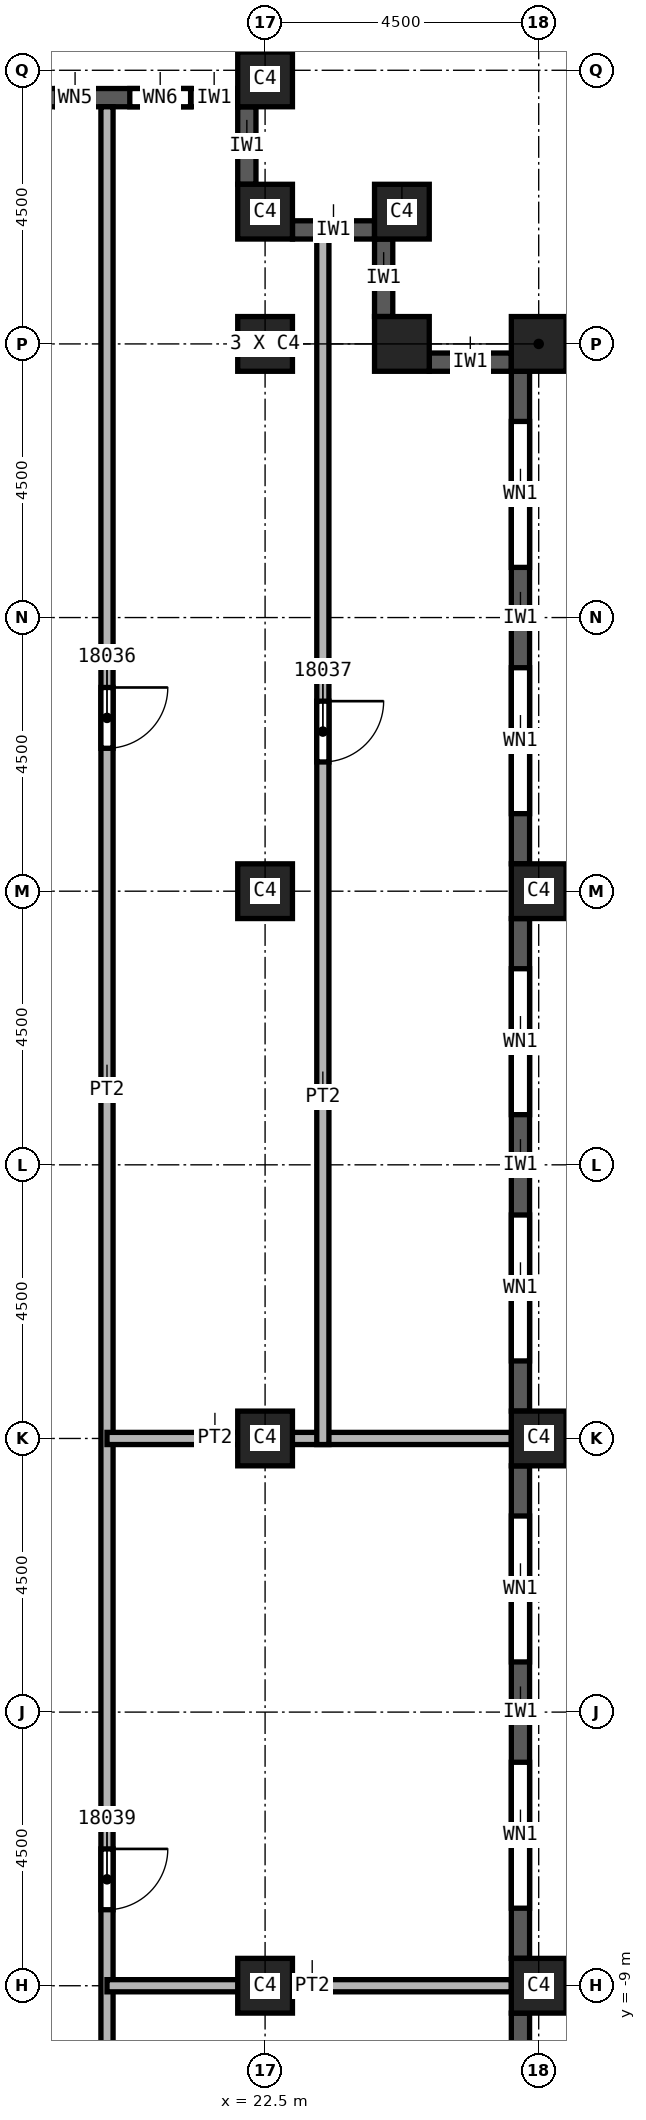
"""IFC4 building model, lengths in metres.
Left out: names, types, materials, properties, quantities, classifications, styles, units other than length and angle.
Written with IfcOpenShell. Run it as: python <this file> out.ifc"""

import sys

from ifc_helpers import new_model, si_unit, direction, frame, frame_2d, origin, origin_2d, place, context, subcontext, project, spatial, rectangle, extrude, element, fill, save


model = new_model("IFC4")
c1 = context("Model", 3, precision=1e-05, world=origin(), true_north=direction((0.0, 1.0)))
c2 = subcontext(c1, "Body", "Model", "MODEL_VIEW")
j1 = project(units=[si_unit("LENGTHUNIT", "METRE"), si_unit("PLANEANGLEUNIT", "RADIAN")], contexts=[c1])
p1 = place(None, origin())
s1 = spatial("IfcSite", under=j1, at=p1, CompositionType="ELEMENT")
p2 = place(p1, origin())
s2 = spatial("IfcBuilding", under=s1, at=p2, CompositionType="ELEMENT")
p3 = place(p2, frame((0.0, 0.0, 266.0)))
s3 = spatial("IfcBuildingStorey", under=s2, at=p3, CompositionType="ELEMENT", Elevation=266.0)
for number, where, z_axis, x_axis in (
    (1, (22.5, 0.0, 0.0), (0.0, 0.0, 1.0), (1.0, 0.0, 0.0)),
    (2, (22.5, 9.0, 0.0), (0.0, 0.0, 1.0), (1.0, 0.0, 0.0)),
    (3, (22.5, 18.0, 0.0), (0.0, 0.0, 1.0), (1.0, 0.0, 0.0)),
    (4, (22.5, -9.0, 0.0), (0.0, 0.0, 1.0), (1.0, 0.0, 0.0)),
    (5, (27.0, 0.0, 0.0), (0.0, 0.0, 1.0), (0.0, 1.0, 0.0)),
    (6, (27.0, 9.0, 0.0), (0.0, 0.0, 1.0), (0.0, 1.0, 0.0)),
    (7, (27.0, 18.0, 0.0), (0.0, 0.0, 1.0), (0.0, 1.0, 0.0)),
    (8, (27.0, -9.0, 0.0), (0.0, 0.0, 1.0), (0.0, 1.0, 0.0)),
    (9, (22.5, 22.35, 0.0), (0.0, 0.0, 1.0), (1.0, 0.0, 0.0)),
    (10, (22.5, 20.175, 0.0), (0.0, 0.0, 1.0), (1.0, 0.0, 0.0)),
    (11, (24.75, 20.175, 0.0), (0.0, 0.0, 1.0), (1.0, 0.0, 0.0)),
    (12, (24.75, 18.0, 0.0), (0.0, 0.0, 1.0), (1.0, 0.0, 0.0)),
):
    element("IfcColumn", number, at=place(p3, frame(where, z_axis=z_axis, x_axis=x_axis)), inside=s3, PredefinedType="COLUMN", context=c2, shape_type="SweptSolid", body=[
        extrude(rectangle(XDim=0.9, YDim=0.9, at=origin_2d()), origin(), (0.0, 0.0, 1.0), 3.72),
    ])
p4 = place(p3, frame((26.7, -17.55, 0.0), z_axis=(0.0, 0.0, 1.0), x_axis=(0.0, 1.0, 0.0)))
e13 = element("IfcWall", 13, at=p4, inside=s3, PredefinedType="SOLIDWALL", context=c2, shape_type="SweptSolid", body=[
    extrude(rectangle(XDim=8.1, YDim=0.3, at=frame_2d((4.05, 0.0))), origin(), (0.0, 0.0, 1.0), 3.12),
])
p5 = place(p4, frame((0.825, 0.0, 0.8)))
e14 = element("IfcOpeningElement", 14, at=p5, cuts=e13, PredefinedType="OPENING", context=c2, shape_type="SweptSolid", body=[
    extrude(rectangle(XDim=2.4, YDim=1.95, at=frame_2d((1.2, 0.975))), frame((0.0, 0.15, 0.0), z_axis=(0.0, -1.0, 0.0), x_axis=(1.0, 0.0, 0.0)), (0.0, 0.0, 1.0), 0.3),
])
p6 = place(p4, frame((4.875, 0.0, 0.8)))
e15 = element("IfcOpeningElement", 15, at=p6, cuts=e13, PredefinedType="OPENING", context=c2, shape_type="SweptSolid", body=[
    extrude(rectangle(XDim=2.4, YDim=1.95, at=frame_2d((1.2, 0.975))), frame((0.0, 0.15, 0.0), z_axis=(0.0, -1.0, 0.0), x_axis=(1.0, 0.0, 0.0)), (0.0, 0.0, 1.0), 0.3),
])
p7 = place(p3, frame((26.7, -8.55, 0.0), z_axis=(0.0, 0.0, 1.0), x_axis=(0.0, 1.0, 0.0)))
e16 = element("IfcWall", 16, at=p7, inside=s3, PredefinedType="SOLIDWALL", context=c2, shape_type="SweptSolid", body=[
    extrude(rectangle(XDim=8.1, YDim=0.3, at=frame_2d((4.05, 0.0))), origin(), (0.0, 0.0, 1.0), 3.12),
])
p8 = place(p7, frame((0.825, 0.0, 0.8)))
e17 = element("IfcOpeningElement", 17, at=p8, cuts=e16, PredefinedType="OPENING", context=c2, shape_type="SweptSolid", body=[
    extrude(rectangle(XDim=2.4, YDim=1.95, at=frame_2d((1.2, 0.975))), frame((0.0, 0.15, 0.0), z_axis=(0.0, -1.0, 0.0), x_axis=(1.0, 0.0, 0.0)), (0.0, 0.0, 1.0), 0.3),
])
p9 = place(p7, frame((4.875, 0.0, 0.8)))
e18 = element("IfcOpeningElement", 18, at=p9, cuts=e16, PredefinedType="OPENING", context=c2, shape_type="SweptSolid", body=[
    extrude(rectangle(XDim=2.4, YDim=1.95, at=frame_2d((1.2, 0.975))), frame((0.0, 0.15, 0.0), z_axis=(0.0, -1.0, 0.0), x_axis=(1.0, 0.0, 0.0)), (0.0, 0.0, 1.0), 0.3),
])
p10 = place(p3, frame((26.7, 0.45, 0.0), z_axis=(0.0, 0.0, 1.0), x_axis=(0.0, 1.0, 0.0)))
e19 = element("IfcWall", 19, at=p10, inside=s3, PredefinedType="SOLIDWALL", context=c2, shape_type="SweptSolid", body=[
    extrude(rectangle(XDim=8.1, YDim=0.3, at=frame_2d((4.05, 0.0))), origin(), (0.0, 0.0, 1.0), 3.12),
])
p11 = place(p10, frame((0.825, 0.0, 0.8)))
e20 = element("IfcOpeningElement", 20, at=p11, cuts=e19, PredefinedType="OPENING", context=c2, shape_type="SweptSolid", body=[
    extrude(rectangle(XDim=2.4, YDim=1.95, at=frame_2d((1.2, 0.975))), frame((0.0, 0.15, 0.0), z_axis=(0.0, -1.0, 0.0), x_axis=(1.0, 0.0, 0.0)), (0.0, 0.0, 1.0), 0.3),
])
p12 = place(p10, frame((4.875, 0.0, 0.8)))
e21 = element("IfcOpeningElement", 21, at=p12, cuts=e19, PredefinedType="OPENING", context=c2, shape_type="SweptSolid", body=[
    extrude(rectangle(XDim=2.4, YDim=1.95, at=frame_2d((1.2, 0.975))), frame((0.0, 0.15, 0.0), z_axis=(0.0, -1.0, 0.0), x_axis=(1.0, 0.0, 0.0)), (0.0, 0.0, 1.0), 0.3),
])
p13 = place(p3, frame((26.7, 9.45, 0.0), z_axis=(0.0, 0.0, 1.0), x_axis=(0.0, 1.0, 0.0)))
e22 = element("IfcWall", 22, at=p13, inside=s3, PredefinedType="SOLIDWALL", context=c2, shape_type="SweptSolid", body=[
    extrude(rectangle(XDim=8.1, YDim=0.3, at=frame_2d((4.05, 0.0))), origin(), (0.0, 0.0, 1.0), 3.12),
])
p14 = place(p13, frame((0.825, 0.0, 0.8)))
e23 = element("IfcOpeningElement", 23, at=p14, cuts=e22, PredefinedType="OPENING", context=c2, shape_type="SweptSolid", body=[
    extrude(rectangle(XDim=2.4, YDim=1.95, at=frame_2d((1.2, 0.975))), frame((0.0, 0.15, 0.0), z_axis=(0.0, -1.0, 0.0), x_axis=(1.0, 0.0, 0.0)), (0.0, 0.0, 1.0), 0.3),
])
p15 = place(p13, frame((4.875, 0.0, 0.8)))
e24 = element("IfcOpeningElement", 24, at=p15, cuts=e22, PredefinedType="OPENING", context=c2, shape_type="SweptSolid", body=[
    extrude(rectangle(XDim=2.4, YDim=1.95, at=frame_2d((1.2, 0.975))), frame((0.0, 0.15, 0.0), z_axis=(0.0, -1.0, 0.0), x_axis=(1.0, 0.0, 0.0)), (0.0, 0.0, 1.0), 0.3),
])
p16 = place(p3, frame((26.55, 17.7, 0.0), z_axis=(0.0, 0.0, 1.0), x_axis=(-1.0, 0.0, 0.0)))
e25 = element("IfcWall", 25, at=p16, inside=s3, PredefinedType="SOLIDWALL", context=c2, shape_type="SweptSolid", body=[
    extrude(rectangle(XDim=1.35, YDim=0.3, at=frame_2d((0.675, 0.0))), origin(), (0.0, 0.0, 1.0), 3.12),
])
p17 = place(p3, frame((24.45, 18.45, 0.0), z_axis=(0.0, 0.0, 1.0), x_axis=(0.0, 1.0, 0.0)))
e26 = element("IfcWall", 26, at=p17, inside=s3, PredefinedType="SOLIDWALL", context=c2, shape_type="SweptSolid", body=[
    extrude(rectangle(XDim=1.275, YDim=0.3, at=frame_2d((0.638, 0.0))), origin(), (0.0, 0.0, 1.0), 3.12),
])
p18 = place(p3, frame((24.3, 19.875, 0.0), z_axis=(0.0, 0.0, 1.0), x_axis=(-1.0, 0.0, 0.0)))
e27 = element("IfcWall", 27, at=p18, inside=s3, PredefinedType="SOLIDWALL", context=c2, shape_type="SweptSolid", body=[
    extrude(rectangle(XDim=1.35, YDim=0.3, at=frame_2d((0.675, 0.0))), origin(), (0.0, 0.0, 1.0), 3.12),
])
p19 = place(p3, frame((22.2, 20.625, 0.0), z_axis=(0.0, 0.0, 1.0), x_axis=(0.0, 1.0, 0.0)))
e28 = element("IfcWall", 28, at=p19, inside=s3, PredefinedType="SOLIDWALL", context=c2, shape_type="SweptSolid", body=[
    extrude(rectangle(XDim=1.275, YDim=0.3, at=frame_2d((0.637, 0.0))), origin(), (0.0, 0.0, 1.0), 3.12),
])
p20 = place(p3, frame((22.05, 22.05, 0.0), z_axis=(0.0, 0.0, 1.0), x_axis=(-1.0, 0.0, 0.0)))
e29 = element("IfcWall", 29, at=p20, inside=s3, PredefinedType="SOLIDWALL", context=c2, shape_type="SweptSolid", body=[
    extrude(rectangle(XDim=3.6, YDim=0.3, at=frame_2d((1.8, 0.0))), origin(), (0.0, 0.0, 1.0), 3.12),
])
p21 = place(p20, frame((0.775, 0.0, 0.8)))
e30 = element("IfcOpeningElement", 30, at=p21, cuts=e29, PredefinedType="OPENING", context=c2, shape_type="SweptSolid", body=[
    extrude(rectangle(XDim=1.0, YDim=1.95, at=frame_2d((0.5, 0.975))), frame((0.0, 0.15, 0.0), z_axis=(0.0, -1.0, 0.0), x_axis=(1.0, 0.0, 0.0)), (0.0, 0.0, 1.0), 0.3),
])
p22 = place(p20, frame((2.375, 0.0, 0.8)))
e31 = element("IfcOpeningElement", 31, at=p22, cuts=e29, PredefinedType="OPENING", context=c2, shape_type="SweptSolid", body=[
    extrude(rectangle(XDim=0.6, YDim=1.95, at=frame_2d((0.3, 0.975))), frame((0.0, 0.15, 0.0), z_axis=(0.0, -1.0, 0.0), x_axis=(1.0, 0.0, 0.0)), (0.0, 0.0, 1.0), 0.3),
])
p23 = place(p3, frame((19.9, 21.9, 0.0), z_axis=(0.0, 0.0, 1.0), x_axis=(0.0, -1.0, 0.0)))
e32 = element("IfcWall", 32, at=p23, inside=s3, PredefinedType="PARTITIONING", context=c2, shape_type="SweptSolid", body=[
    extrude(rectangle(XDim=43.8, YDim=0.2, at=frame_2d((21.9, 0.0))), origin(), (0.0, 0.0, 1.0), 3.72),
])
p24 = place(p23, frame((9.55, 0.0, 0.0)))
e33 = element("IfcOpeningElement", 33, at=p24, cuts=e32, PredefinedType="OPENING", context=c2, shape_type="SweptSolid", body=[
    extrude(rectangle(XDim=1.0, YDim=2.1, at=frame_2d((0.5, 1.05))), frame((0.0, 0.1, 0.0), z_axis=(0.0, -1.0, 0.0), x_axis=(1.0, 0.0, 0.0)), (0.0, 0.0, 1.0), 0.2),
])
p25 = place(p23, frame((33.4, 0.0, 0.0)))
e34 = element("IfcOpeningElement", 34, at=p25, cuts=e32, PredefinedType="OPENING", context=c2, shape_type="SweptSolid", body=[
    extrude(rectangle(XDim=1.0, YDim=2.1, at=frame_2d((0.5, 1.05))), frame((0.0, 0.1, 0.0), z_axis=(0.0, -1.0, 0.0), x_axis=(1.0, 0.0, 0.0)), (0.0, 0.0, 1.0), 0.2),
])
p26 = place(p23, frame((28.65, 0.0, 0.0)))
e35 = element("IfcOpeningElement", 35, at=p26, cuts=e32, PredefinedType="OPENING", context=c2, shape_type="SweptSolid", body=[
    extrude(rectangle(XDim=1.0, YDim=2.1, at=frame_2d((0.5, 1.05))), frame((0.0, 0.1, 0.0), z_axis=(0.0, -1.0, 0.0), x_axis=(1.0, 0.0, 0.0)), (0.0, 0.0, 1.0), 0.2),
])
for number, where, z_axis, x_axis in (
    (36, (19.9, -9.0, 0.0), (0.0, 0.0, 1.0), (1.0, 0.0, 0.0)),
    (37, (26.55, 0.0, 0.0), (0.0, 0.0, 1.0), (-1.0, 0.0, 0.0)),
):
    element("IfcWall", number, at=place(p3, frame(where, z_axis=z_axis, x_axis=x_axis)), inside=s3, PredefinedType="PARTITIONING", context=c2, shape_type="SweptSolid", body=[
        extrude(rectangle(XDim=6.65, YDim=0.2, at=frame_2d((3.325, 0.0))), origin(), (0.0, 0.0, 1.0), 3.72),
    ])
p27 = place(p3, frame((23.45, 19.725, 0.0), z_axis=(0.0, 0.0, 1.0), x_axis=(0.0, -1.0, 0.0)))
e38 = element("IfcWall", 38, at=p27, inside=s3, PredefinedType="PARTITIONING", context=c2, shape_type="SweptSolid", body=[
    extrude(rectangle(XDim=19.825, YDim=0.2, at=frame_2d((9.913, 0.0))), origin(), (0.0, 0.0, 1.0), 3.72),
])
p28 = place(p27, frame((7.6, 0.0, 0.0)))
e39 = element("IfcOpeningElement", 39, at=p28, cuts=e38, PredefinedType="OPENING", context=c2, shape_type="SweptSolid", body=[
    extrude(rectangle(XDim=1.0, YDim=2.1, at=frame_2d((0.5, 1.05))), frame((0.0, 0.1, 0.0), z_axis=(0.0, -1.0, 0.0), x_axis=(1.0, 0.0, 0.0)), (0.0, 0.0, 1.0), 0.2),
])
p29 = place(p8, origin())
e40 = element("IfcWindow", 40, at=p29, inside=s3, PartitioningType="SINGLE_PANEL", PredefinedType="WINDOW", context=c2, shape_type="SweptSolid", body=[
    extrude(rectangle(XDim=2.4, YDim=1.95, at=frame_2d((1.2, 0.975))), frame((0.0, 0.03, 0.0), z_axis=(0.0, -1.0, 0.0), x_axis=(1.0, 0.0, 0.0)), (0.0, 0.0, 1.0), 0.06),
])
fill(e17, e40)
p30 = place(p9, origin())
e41 = element("IfcWindow", 41, at=p30, inside=s3, PartitioningType="SINGLE_PANEL", PredefinedType="WINDOW", context=c2, shape_type="SweptSolid", body=[
    extrude(rectangle(XDim=2.4, YDim=1.95, at=frame_2d((1.2, 0.975))), frame((0.0, 0.03, 0.0), z_axis=(0.0, -1.0, 0.0), x_axis=(1.0, 0.0, 0.0)), (0.0, 0.0, 1.0), 0.06),
])
fill(e18, e41)
p31 = place(p11, origin())
e42 = element("IfcWindow", 42, at=p31, inside=s3, PartitioningType="SINGLE_PANEL", PredefinedType="WINDOW", context=c2, shape_type="SweptSolid", body=[
    extrude(rectangle(XDim=2.4, YDim=1.95, at=frame_2d((1.2, 0.975))), frame((0.0, 0.03, 0.0), z_axis=(0.0, -1.0, 0.0), x_axis=(1.0, 0.0, 0.0)), (0.0, 0.0, 1.0), 0.06),
])
fill(e20, e42)
p32 = place(p12, origin())
e43 = element("IfcWindow", 43, at=p32, inside=s3, PartitioningType="SINGLE_PANEL", PredefinedType="WINDOW", context=c2, shape_type="SweptSolid", body=[
    extrude(rectangle(XDim=2.4, YDim=1.95, at=frame_2d((1.2, 0.975))), frame((0.0, 0.03, 0.0), z_axis=(0.0, -1.0, 0.0), x_axis=(1.0, 0.0, 0.0)), (0.0, 0.0, 1.0), 0.06),
])
fill(e21, e43)
p33 = place(p14, origin())
e44 = element("IfcWindow", 44, at=p33, inside=s3, PartitioningType="SINGLE_PANEL", PredefinedType="WINDOW", context=c2, shape_type="SweptSolid", body=[
    extrude(rectangle(XDim=2.4, YDim=1.95, at=frame_2d((1.2, 0.975))), frame((0.0, 0.03, 0.0), z_axis=(0.0, -1.0, 0.0), x_axis=(1.0, 0.0, 0.0)), (0.0, 0.0, 1.0), 0.06),
])
fill(e23, e44)
p34 = place(p15, origin())
e45 = element("IfcWindow", 45, at=p34, inside=s3, PartitioningType="SINGLE_PANEL", PredefinedType="WINDOW", context=c2, shape_type="SweptSolid", body=[
    extrude(rectangle(XDim=2.4, YDim=1.95, at=frame_2d((1.2, 0.975))), frame((0.0, 0.03, 0.0), z_axis=(0.0, -1.0, 0.0), x_axis=(1.0, 0.0, 0.0)), (0.0, 0.0, 1.0), 0.06),
])
fill(e24, e45)
p35 = place(p24, origin())
e46 = element("IfcDoor", 46, at=p35, inside=s3, OperationType="SINGLE_SWING_LEFT", PredefinedType="DOOR", context=c2, shape_type="SweptSolid", body=[
    extrude(rectangle(XDim=1.0, YDim=2.1, at=frame_2d((0.5, 1.05))), frame((0.0, 0.025, 0.0), z_axis=(0.0, -1.0, 0.0), x_axis=(1.0, 0.0, 0.0)), (0.0, 0.0, 1.0), 0.05),
])
fill(e33, e46)
p36 = place(p28, origin())
e47 = element("IfcDoor", 47, at=p36, inside=s3, OperationType="SINGLE_SWING_RIGHT", PredefinedType="DOOR", context=c2, shape_type="SweptSolid", body=[
    extrude(rectangle(XDim=1.0, YDim=2.1, at=frame_2d((0.5, 1.05))), frame((0.0, 0.025, 0.0), z_axis=(0.0, -1.0, 0.0), x_axis=(1.0, 0.0, 0.0)), (0.0, 0.0, 1.0), 0.05),
])
fill(e39, e47)
p37 = place(p26, origin())
e48 = element("IfcDoor", 48, at=p37, inside=s3, OperationType="SINGLE_SWING_RIGHT", PredefinedType="DOOR", context=c2, shape_type="SweptSolid", body=[
    extrude(rectangle(XDim=1.0, YDim=2.1, at=frame_2d((0.5, 1.05))), frame((0.0, 0.025, 0.0), z_axis=(0.0, -1.0, 0.0), x_axis=(1.0, 0.0, 0.0)), (0.0, 0.0, 1.0), 0.05),
])
fill(e35, e48)
p38 = place(p21, origin())
e49 = element("IfcWindow", 49, at=p38, inside=s3, PartitioningType="SINGLE_PANEL", PredefinedType="WINDOW", context=c2, shape_type="SweptSolid", body=[
    extrude(rectangle(XDim=1.0, YDim=1.95, at=frame_2d((0.5, 0.975))), frame((0.0, 0.03, 0.0), z_axis=(0.0, -1.0, 0.0), x_axis=(1.0, 0.0, 0.0)), (0.0, 0.0, 1.0), 0.06),
])
fill(e30, e49)
p39 = place(p22, origin())
e50 = element("IfcWindow", 50, at=p39, inside=s3, PartitioningType="SINGLE_PANEL", PredefinedType="WINDOW", context=c2, shape_type="SweptSolid", body=[
    extrude(rectangle(XDim=0.6, YDim=1.95, at=frame_2d((0.3, 0.975))), frame((0.0, 0.03, 0.0), z_axis=(0.0, -1.0, 0.0), x_axis=(1.0, 0.0, 0.0)), (0.0, 0.0, 1.0), 0.06),
])
fill(e31, e50)
save(model, sys.argv[1])
